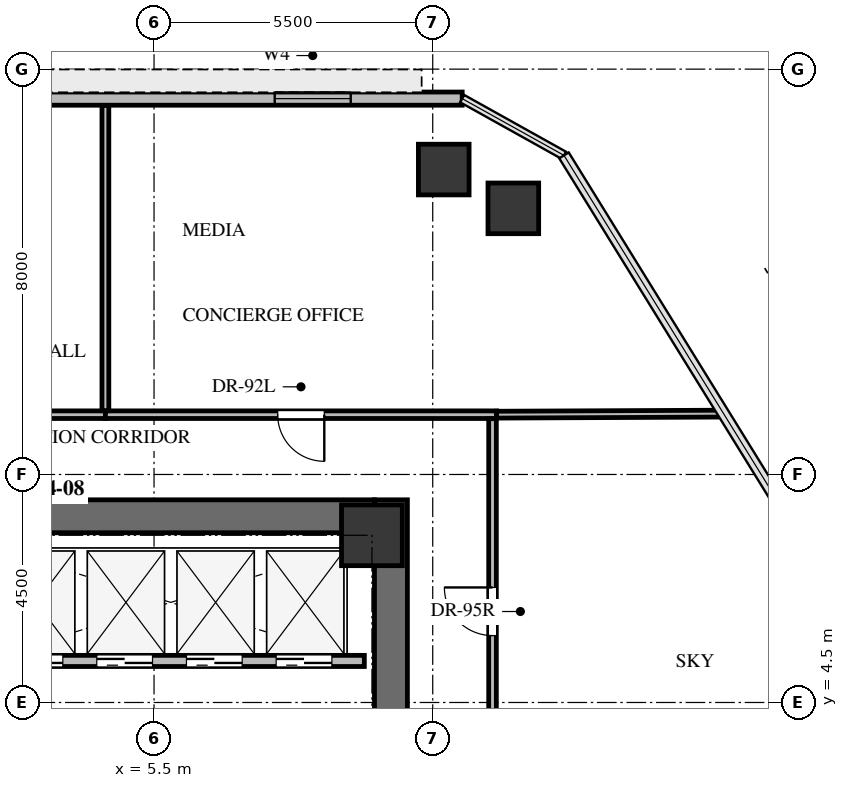
"""IFC4 building model, lengths in metres.
Left out: names, types, materials, properties, quantities, classifications, styles, units other than length and angle.
Written with IfcOpenShell. Run it as: python <this file> out.ifc"""

import sys

from ifc_helpers import new_model, si_unit, direction, frame, frame_2d, origin, origin_2d, place, context, subcontext, project, spatial, rectangle, extrude, source, transform, mapped, element, fill, save


model = new_model("IFC4")
c1 = context("Model", 3, precision=1e-05, world=origin(), true_north=direction((0.0, 1.0)))
c2 = subcontext(c1, "Body", "Model", "MODEL_VIEW")
j1 = project(units=[si_unit("LENGTHUNIT", "METRE"), si_unit("PLANEANGLEUNIT", "RADIAN")], contexts=[c1])
p1 = place(None, origin())
s1 = spatial("IfcSite", under=j1, at=p1, CompositionType="ELEMENT")
p2 = place(p1, origin())
s2 = spatial("IfcBuilding", under=s1, at=p2, CompositionType="ELEMENT")
p3 = place(p2, frame((0.0, 0.0, 155.1)))
s3 = spatial("IfcBuildingStorey", under=s2, at=p3, CompositionType="ELEMENT", Elevation=155.1)
p4 = place(p3, frame((10.175, -8.5, 0.0), z_axis=(0.0, 0.0, 1.0), x_axis=(0.0, 1.0, 0.0)))
e1 = element("IfcWall", 1, at=p4, inside=s3, PredefinedType="SHEAR", context=c2, shape_type="SweptSolid", body=[
    extrude(rectangle(XDim=17.0, YDim=0.65, at=frame_2d((8.5, 0.0))), origin(), (0.0, 0.0, 1.0), 4.2),
])
p5 = place(p3, frame((-9.85, 8.175, 0.0), z_axis=(0.0, 0.0, 1.0), x_axis=(1.0, 0.0, 0.0)))
e2 = element("IfcWall", 2, at=p5, inside=s3, PredefinedType="SHEAR", context=c2, shape_type="SweptSolid", body=[
    extrude(rectangle(XDim=19.7, YDim=0.65, at=frame_2d((9.85, 0.0))), origin(), (0.0, 0.0, 1.0), 4.2),
])
m1 = source(origin(), c2, "Body", "SweptSolid", [
    extrude(rectangle(XDim=1.2, YDim=1.2, at=origin_2d()), origin(), (0.0, 0.0, 1.0), 4.28),
])
p6 = place(p3, frame((9.8, 7.8, -0.32), z_axis=(0.0, 0.0, 1.0), x_axis=(1.0, 0.0, 0.0)))
e3 = element("IfcColumn", 3, at=p6, inside=s3, PredefinedType="COLUMN", context=c2, shape_type="MappedRepresentation", body=[
    mapped(m1, transform((0.0, 0.0, 0.0), x_axis=(1.0, 0.0, 0.0), y_axis=(0.0, 1.0, 0.0), z_axis=(0.0, 0.0, 1.0), scale=1.0)),
])
m2 = source(origin(), c2, "Body", "SweptSolid", [
    extrude(rectangle(XDim=1.0, YDim=1.0, at=origin_2d()), origin(), (0.0, 0.0, 1.0), 4.28),
])
for number, where, z_axis, x_axis in (
    (4, (11.218, 15.018, -0.32), (0.0, 0.0, 1.0), (1.0, 0.0, 0.0)),
    (5, (12.591, 14.252, -0.32), (0.0, 0.0, 1.0), (1.0, 0.0, 0.0)),
):
    element("IfcColumn", number, at=place(p3, frame(where, z_axis=z_axis, x_axis=x_axis)), inside=s3, PredefinedType="COLUMN", context=c2, shape_type="MappedRepresentation", body=[
        mapped(m2, transform((0.0, 0.0, 0.0), x_axis=(1.0, 0.0, 0.0), y_axis=(0.0, 1.0, 0.0), z_axis=(0.0, 0.0, 1.0), scale=1.0)),
    ])
p7 = place(p3, frame((-6.917, 16.418, 0.0), z_axis=(0.0, 0.0, 1.0), x_axis=(1.0, 0.0, 0.0)))
e6 = element("IfcWall", 6, at=p7, inside=s3, PredefinedType="SOLIDWALL", context=c2, shape_type="SweptSolid", body=[
    extrude(rectangle(XDim=18.499, YDim=0.26, at=frame_2d((9.249, 0.0))), origin(), (0.0, 0.0, 1.0), 3.96),
])
p8 = place(p7, frame((2.2, 0.0, 0.9)))
e7 = element("IfcOpeningElement", 7, at=p8, cuts=e6, PredefinedType="OPENING", context=c2, shape_type="SweptSolid", body=[
    extrude(rectangle(XDim=1.5, YDim=1.6, at=frame_2d((0.75, 0.8))), frame((0.0, 0.14, 0.0), z_axis=(0.0, -1.0, 0.0), x_axis=(1.0, 0.0, 0.0)), (0.0, 0.0, 1.0), 0.28),
])
p9 = place(p7, frame((14.799, 0.0, 0.9)))
e8 = element("IfcOpeningElement", 8, at=p9, cuts=e6, PredefinedType="OPENING", context=c2, shape_type="SweptSolid", body=[
    extrude(rectangle(XDim=1.5, YDim=1.6, at=frame_2d((0.75, 0.8))), frame((0.0, 0.14, 0.0), z_axis=(0.0, -1.0, 0.0), x_axis=(1.0, 0.0, 0.0)), (0.0, 0.0, 1.0), 0.28),
])
p10 = place(p3, frame((2.325, 5.32, 0.0), z_axis=(0.0, 0.0, 1.0), x_axis=(1.0, 0.0, 0.0)))
e9 = element("IfcWall", 9, at=p10, inside=s3, PredefinedType="SOLIDWALL", context=c2, shape_type="SweptSolid", body=[
    extrude(rectangle(XDim=7.325, YDim=0.22, at=frame_2d((3.663, 0.0))), origin(), (0.0, 0.0, 1.0), 3.945),
])
p11 = place(p10, frame((0.275, 0.0, 0.0)))
e10 = element("IfcOpeningElement", 10, at=p11, cuts=e9, PredefinedType="OPENING", context=c2, shape_type="SweptSolid", body=[
    extrude(rectangle(XDim=1.1, YDim=2.15, at=frame_2d((0.55, 1.075))), frame((0.0, 0.12, 0.0), z_axis=(0.0, -1.0, 0.0), x_axis=(1.0, 0.0, 0.0)), (0.0, 0.0, 1.0), 0.24),
])
p12 = place(p10, frame((2.045, 0.0, 0.0)))
e11 = element("IfcOpeningElement", 11, at=p12, cuts=e9, PredefinedType="OPENING", context=c2, shape_type="SweptSolid", body=[
    extrude(rectangle(XDim=1.1, YDim=2.15, at=frame_2d((0.55, 1.075))), frame((0.0, 0.12, 0.0), z_axis=(0.0, -1.0, 0.0), x_axis=(1.0, 0.0, 0.0)), (0.0, 0.0, 1.0), 0.24),
])
p13 = place(p10, frame((3.815, 0.0, 0.0)))
e12 = element("IfcOpeningElement", 12, at=p13, cuts=e9, PredefinedType="OPENING", context=c2, shape_type="SweptSolid", body=[
    extrude(rectangle(XDim=1.1, YDim=2.15, at=frame_2d((0.55, 1.075))), frame((0.0, 0.12, 0.0), z_axis=(0.0, -1.0, 0.0), x_axis=(1.0, 0.0, 0.0)), (0.0, 0.0, 1.0), 0.24),
])
p14 = place(p10, frame((5.585, 0.0, 0.0)))
e13 = element("IfcOpeningElement", 13, at=p14, cuts=e9, PredefinedType="OPENING", context=c2, shape_type="SweptSolid", body=[
    extrude(rectangle(XDim=1.1, YDim=2.15, at=frame_2d((0.55, 1.075))), frame((0.0, 0.12, 0.0), z_axis=(0.0, -1.0, 0.0), x_axis=(1.0, 0.0, 0.0)), (0.0, 0.0, 1.0), 0.24),
])
p15 = place(p3, frame((4.54, 10.18, 0.0), z_axis=(0.0, 0.0, 1.0), x_axis=(-1.0, 0.0, 0.0)))
e14 = element("IfcWall", 14, at=p15, inside=s3, PredefinedType="PARTITIONING", context=c2, shape_type="SweptSolid", body=[
    extrude(rectangle(XDim=3.451, YDim=0.15, at=frame_2d((1.726, 0.0))), origin(), (0.0, 0.0, 1.0), 3.508),
])
p16 = place(p3, frame((12.26, 10.18, 0.0), z_axis=(0.0, 0.0, 1.0), x_axis=(-1.0, 0.0, 0.0)))
e15 = element("IfcWall", 15, at=p16, inside=s3, PredefinedType="PARTITIONING", context=c2, shape_type="SweptSolid", body=[
    extrude(rectangle(XDim=7.72, YDim=0.15, at=frame_2d((3.86, 0.0))), origin(), (0.0, 0.0, 1.0), 3.142),
])
p17 = place(p16, frame((3.4, 0.0, 0.0)))
e16 = element("IfcOpeningElement", 16, at=p17, cuts=e15, PredefinedType="OPENING", context=c2, shape_type="SweptSolid", body=[
    extrude(rectangle(XDim=0.92, YDim=2.1, at=frame_2d((0.46, 1.05))), frame((0.0, 0.085, 0.0), z_axis=(0.0, -1.0, 0.0), x_axis=(1.0, 0.0, 0.0)), (0.0, 0.0, 1.0), 0.17),
])
p18 = place(p3, frame((12.18, 2.49, 0.0), z_axis=(0.0, 0.0, 1.0), x_axis=(0.0, 1.0, 0.0)))
e17 = element("IfcWall", 17, at=p18, inside=s3, PredefinedType="PARTITIONING", context=c2, shape_type="SweptSolid", body=[
    extrude(rectangle(XDim=7.611, YDim=0.15, at=frame_2d((3.806, 0.0))), origin(), (0.0, 0.0, 1.0), 3.945),
])
p19 = place(p18, frame((3.331, 0.0, 0.0)))
e18 = element("IfcOpeningElement", 18, at=p19, cuts=e17, PredefinedType="OPENING", context=c2, shape_type="SweptSolid", body=[
    extrude(rectangle(XDim=0.95, YDim=2.1, at=frame_2d((0.475, 1.05))), frame((0.0, 0.085, 0.0), z_axis=(0.0, -1.0, 0.0), x_axis=(1.0, 0.0, 0.0)), (0.0, 0.0, 1.0), 0.17),
])
p20 = place(p3, frame((4.54, 16.283, 0.0), z_axis=(0.0, 0.0, 1.0), x_axis=(0.0, -1.0, 0.0)))
e19 = element("IfcWall", 19, at=p20, inside=s3, PredefinedType="PARTITIONING", context=c2, shape_type="SweptSolid", body=[
    extrude(rectangle(XDim=6.024, YDim=0.135, at=frame_2d((3.012, 0.0))), origin(), (0.0, 0.0, 1.0), 3.299),
])
p21 = place(p3, frame((16.74, 10.201, 0.0), z_axis=(0.0, 0.0, 1.0), x_axis=(-0.999989522694, -0.004577608714, 0.0)))
e20 = element("IfcWall", 20, at=p21, inside=s3, PredefinedType="PARTITIONING", context=c2, shape_type="SweptSolid", body=[
    extrude(rectangle(XDim=4.48, YDim=0.135, at=frame_2d((2.24, 0.0))), origin(), (0.0, 0.0, 1.0), 3.299),
])
m3 = source(origin(), c2, "Body", "SweptSolid", [
    extrude(rectangle(XDim=1.5, YDim=1.6, at=frame_2d((0.75, 0.8))), frame((0.0, 0.03, 0.0), z_axis=(0.0, -1.0, 0.0), x_axis=(1.0, 0.0, 0.0)), (0.0, 0.0, 1.0), 0.06),
])
p22 = place(p9, origin())
e21 = element("IfcWindow", 21, at=p22, inside=s3, PartitioningType="SINGLE_PANEL", PredefinedType="WINDOW", context=c2, shape_type="MappedRepresentation", body=[
    mapped(m3, transform((0.0, 0.0, 0.0), x_axis=(1.0, 0.0, 0.0), y_axis=(0.0, 1.0, 0.0), z_axis=(0.0, 0.0, 1.0), scale=1.0)),
])
fill(e8, e21)
m4 = source(origin(), c2, "Body", "SweptSolid", [
    extrude(rectangle(XDim=1.1, YDim=2.15, at=frame_2d((0.55, 1.075))), frame((0.0, 0.025, 0.0), z_axis=(0.0, -1.0, 0.0), x_axis=(1.0, 0.0, 0.0)), (0.0, 0.0, 1.0), 0.05),
])
p23 = place(p11, origin())
e22 = element("IfcDoor", 22, at=p23, inside=s3, OperationType="DOUBLE_DOOR_SLIDING", PredefinedType="DOOR", context=c2, shape_type="MappedRepresentation", body=[
    mapped(m4, transform((0.0, 0.0, 0.0), x_axis=(1.0, 0.0, 0.0), y_axis=(0.0, 1.0, 0.0), z_axis=(0.0, 0.0, 1.0), scale=1.0)),
])
fill(e10, e22)
p24 = place(p12, origin())
e23 = element("IfcDoor", 23, at=p24, inside=s3, OperationType="DOUBLE_DOOR_SLIDING", PredefinedType="DOOR", context=c2, shape_type="MappedRepresentation", body=[
    mapped(m4, transform((0.0, 0.0, 0.0), x_axis=(1.0, 0.0, 0.0), y_axis=(0.0, 1.0, 0.0), z_axis=(0.0, 0.0, 1.0), scale=1.0)),
])
fill(e11, e23)
p25 = place(p13, origin())
e24 = element("IfcDoor", 24, at=p25, inside=s3, OperationType="DOUBLE_DOOR_SLIDING", PredefinedType="DOOR", context=c2, shape_type="MappedRepresentation", body=[
    mapped(m4, transform((0.0, 0.0, 0.0), x_axis=(1.0, 0.0, 0.0), y_axis=(0.0, 1.0, 0.0), z_axis=(0.0, 0.0, 1.0), scale=1.0)),
])
fill(e12, e24)
p26 = place(p14, origin())
e25 = element("IfcDoor", 25, at=p26, inside=s3, OperationType="DOUBLE_DOOR_SLIDING", PredefinedType="DOOR", context=c2, shape_type="MappedRepresentation", body=[
    mapped(m4, transform((0.0, 0.0, 0.0), x_axis=(1.0, 0.0, 0.0), y_axis=(0.0, 1.0, 0.0), z_axis=(0.0, 0.0, 1.0), scale=1.0)),
])
fill(e13, e25)
m5 = source(origin(), c2, "Body", "SweptSolid", [
    extrude(rectangle(XDim=0.92, YDim=2.1, at=frame_2d((0.46, 1.05))), frame((0.0, 0.025, 0.0), z_axis=(0.0, -1.0, 0.0), x_axis=(1.0, 0.0, 0.0)), (0.0, 0.0, 1.0), 0.05),
])
p27 = place(p17, origin())
e26 = element("IfcDoor", 26, at=p27, inside=s3, OperationType="SINGLE_SWING_LEFT", PredefinedType="DOOR", context=c2, shape_type="MappedRepresentation", body=[
    mapped(m5, transform((0.0, 0.0, 0.0), x_axis=(1.0, 0.0, 0.0), y_axis=(0.0, 1.0, 0.0), z_axis=(0.0, 0.0, 1.0), scale=1.0)),
])
fill(e16, e26)
m6 = source(origin(), c2, "Body", "SweptSolid", [
    extrude(rectangle(XDim=0.95, YDim=2.1, at=frame_2d((0.475, 1.05))), frame((0.0, 0.025, 0.0), z_axis=(0.0, -1.0, 0.0), x_axis=(1.0, 0.0, 0.0)), (0.0, 0.0, 1.0), 0.05),
])
p28 = place(p19, origin())
e27 = element("IfcDoor", 27, at=p28, inside=s3, OperationType="SINGLE_SWING_RIGHT", PredefinedType="DOOR", context=c2, shape_type="MappedRepresentation", body=[
    mapped(m6, transform((0.0, 0.0, 0.0), x_axis=(1.0, 0.0, 0.0), y_axis=(0.0, 1.0, 0.0), z_axis=(0.0, 0.0, 1.0), scale=1.0)),
])
fill(e18, e27)
save(model, sys.argv[1])
